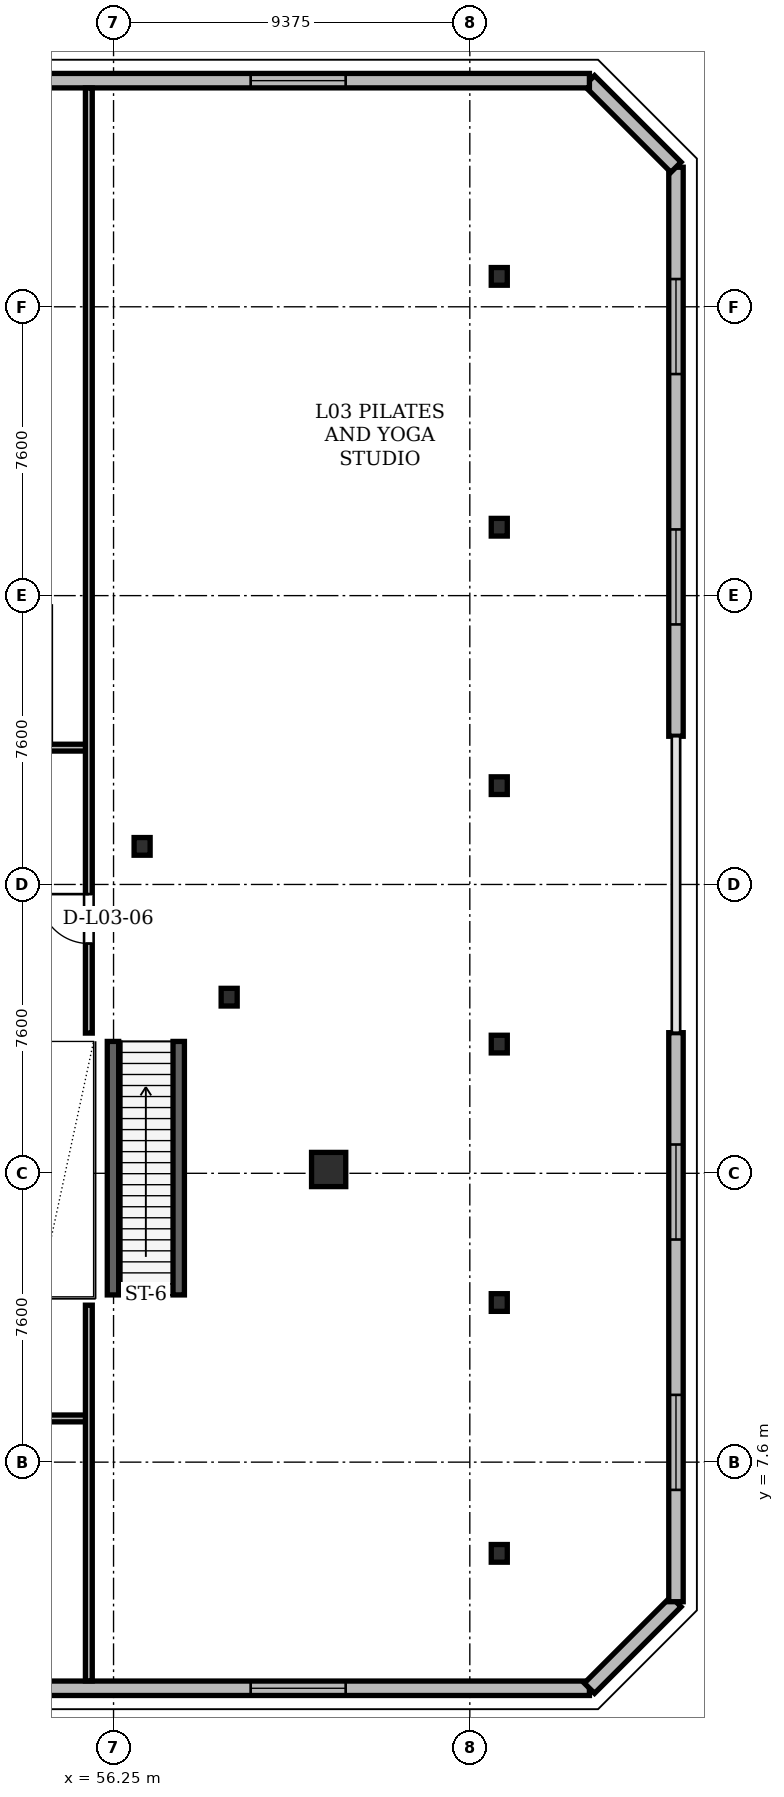
"""IFC4 building model, lengths in metres.
Left out: names, types, materials, properties, quantities, classifications, styles, units other than length and angle.
Written with IfcOpenShell. Run it as: python <this file> out.ifc"""

import sys

from ifc_helpers import new_model, si_unit, direction, frame, frame_2d, origin, origin_2d, place, context, subcontext, project, spatial, rectangle, hollow_rectangle, i_section, extrude, element, fill, save


model = new_model("IFC4")
c1 = context("Model", 3, precision=1e-05, world=origin(), true_north=direction((0.0, 1.0)))
c2 = subcontext(c1, "Body", "Model", "MODEL_VIEW")
j1 = project(units=[si_unit("LENGTHUNIT", "METRE"), si_unit("PLANEANGLEUNIT", "RADIAN")], contexts=[c1])
p1 = place(None, origin())
s1 = spatial("IfcSite", under=j1, at=p1, CompositionType="ELEMENT")
p2 = place(p1, origin())
s2 = spatial("IfcBuilding", under=s1, at=p2, CompositionType="ELEMENT")
p3 = place(p2, frame((0.0, 0.0, 14.1)))
s3 = spatial("IfcBuildingStorey", under=s2, at=p3, CompositionType="ELEMENT", Elevation=14.1)
p4 = place(p3, frame((61.91, 15.3, 0.004), z_axis=(0.0, 0.0, 1.0), x_axis=(1.0, 0.0, 0.0)))
e1 = element("IfcColumn", 1, at=p4, inside=s3, PredefinedType="COLUMN", context=c2, shape_type="SweptSolid", body=[
    extrude(hollow_rectangle(XDim=0.9, YDim=0.9, WallThickness=0.075, at=origin_2d()), origin(), (0.0, 0.0, 1.0), 4.191),
])
for number, where, z_axis, x_axis in (
    (2, (59.292, 19.834, 0.004), (0.0, 0.0, 1.0), (1.0, 0.0, 0.0)),
    (3, (57.002, 23.802, 0.004), (0.0, 0.0, 1.0), (1.0, 0.0, 0.0)),
):
    element("IfcColumn", number, at=place(p3, frame(where, z_axis=z_axis, x_axis=x_axis)), inside=s3, PredefinedType="COLUMN", context=c2, shape_type="SweptSolid", body=[
        extrude(i_section(OverallWidth=0.422, OverallDepth=0.465, WebThickness=0.045, FlangeThickness=0.072, at=origin_2d()), origin(), (0.0, 0.0, 1.0), 4.191),
    ])
for number, where, z_axis, x_axis in (
    (4, (66.4, 5.2, 0.0), (0.0, 0.0, 1.0), (1.0, 0.0, 0.0)),
    (5, (66.4, 11.8, 0.0), (0.0, 0.0, 1.0), (1.0, 0.0, 0.0)),
    (6, (66.4, 18.6, 0.0), (0.0, 0.0, 1.0), (1.0, 0.0, 0.0)),
    (7, (66.4, 25.4, 0.0), (0.0, 0.0, 1.0), (1.0, 0.0, 0.0)),
    (8, (66.4, 32.2, 0.0), (0.0, 0.0, 1.0), (1.0, 0.0, 0.0)),
    (9, (66.4, 38.8, 0.0), (0.0, 0.0, 1.0), (1.0, 0.0, 0.0)),
):
    element("IfcColumn", number, at=place(p3, frame(where, z_axis=z_axis, x_axis=x_axis)), inside=s3, PredefinedType="COLUMN", context=c2, shape_type="SweptSolid", body=[
        extrude(i_section(OverallWidth=0.422, OverallDepth=0.465, WebThickness=0.045, FlangeThickness=0.072, at=origin_2d()), origin(), (0.0, 0.0, 1.0), 4.2),
    ])
for number, where, z_axis, x_axis in (
    (10, (56.235, 12.0, 0.0), (0.0, 0.0, 1.0), (0.0, 1.0, 0.0)),
    (11, (57.965, 12.0, 0.0), (0.0, 0.0, 1.0), (0.0, 1.0, 0.0)),
):
    element("IfcWall", number, at=place(p3, frame(where, z_axis=z_axis, x_axis=x_axis)), inside=s3, PredefinedType="SHEAR", context=c2, shape_type="SweptSolid", body=[
        extrude(rectangle(XDim=6.67, YDim=0.3, at=frame_2d((3.335, 0.0))), origin(), (0.0, 0.0, 1.0), 3.92),
    ])
p5 = place(p3, frame((41.4, 1.65, 0.0), z_axis=(0.0, 0.0, 1.0), x_axis=(1.0, 0.0, 0.0)))
e12 = element("IfcWall", 12, at=p5, inside=s3, PredefinedType="SOLIDWALL", context=c2, shape_type="SweptSolid", body=[
    extrude(rectangle(XDim=27.372, YDim=0.38, at=frame_2d((13.686, 0.0))), origin(), (0.0, 0.0, 1.0), 2.983),
])
p6 = place(p5, frame((18.458, 0.0, 0.85)))
e13 = element("IfcOpeningElement", 13, at=p6, cuts=e12, PredefinedType="OPENING", context=c2, shape_type="SweptSolid", body=[
    extrude(rectangle(XDim=2.5, YDim=1.963, at=frame_2d((1.25, 0.981))), frame((0.0, 0.19, 0.0), z_axis=(0.0, -1.0, 0.0), x_axis=(1.0, 0.0, 0.0)), (0.0, 0.0, 1.0), 0.38),
])
p7 = place(p3, frame((68.772, 1.65, 0.0), z_axis=(0.0, 0.0, 1.0), x_axis=(0.707106781187, 0.707106781187, 0.0)))
e14 = element("IfcWall", 14, at=p7, inside=s3, PredefinedType="SOLIDWALL", context=c2, shape_type="SweptSolid", body=[
    extrude(rectangle(XDim=3.221, YDim=0.38, at=frame_2d((1.611, 0.0))), origin(), (0.0, 0.0, 1.0), 3.92),
])
p8 = place(p3, frame((71.05, 3.928, 0.0), z_axis=(0.0, 0.0, 1.0), x_axis=(0.0, 1.0, 0.0)))
e15 = element("IfcWall", 15, at=p8, inside=s3, PredefinedType="SOLIDWALL", context=c2, shape_type="SweptSolid", body=[
    extrude(rectangle(XDim=14.972, YDim=0.38, at=frame_2d((7.486, 0.0))), origin(), (0.0, 0.0, 1.0), 3.92),
])
p9 = place(p8, frame((2.942, 0.0, 0.85)))
e16 = element("IfcOpeningElement", 16, at=p9, cuts=e15, PredefinedType="OPENING", context=c2, shape_type="SweptSolid", body=[
    extrude(rectangle(XDim=2.5, YDim=2.15, at=frame_2d((1.25, 1.075))), frame((0.0, 0.19, 0.0), z_axis=(0.0, -1.0, 0.0), x_axis=(1.0, 0.0, 0.0)), (0.0, 0.0, 1.0), 0.38),
])
p10 = place(p8, frame((9.53, 0.0, 0.85)))
e17 = element("IfcOpeningElement", 17, at=p10, cuts=e15, PredefinedType="OPENING", context=c2, shape_type="SweptSolid", body=[
    extrude(rectangle(XDim=2.5, YDim=2.15, at=frame_2d((1.25, 1.075))), frame((0.0, 0.19, 0.0), z_axis=(0.0, -1.0, 0.0), x_axis=(1.0, 0.0, 0.0)), (0.0, 0.0, 1.0), 0.38),
])
p11 = place(p3, frame((71.05, 26.7, 0.0), z_axis=(0.0, 0.0, 1.0), x_axis=(0.0, 1.0, 0.0)))
e18 = element("IfcWall", 18, at=p11, inside=s3, PredefinedType="SOLIDWALL", context=c2, shape_type="SweptSolid", body=[
    extrude(rectangle(XDim=14.972, YDim=0.38, at=frame_2d((7.486, 0.0))), origin(), (0.0, 0.0, 1.0), 3.92),
])
p12 = place(p11, frame((2.942, 0.0, 0.85)))
e19 = element("IfcOpeningElement", 19, at=p12, cuts=e18, PredefinedType="OPENING", context=c2, shape_type="SweptSolid", body=[
    extrude(rectangle(XDim=2.5, YDim=2.15, at=frame_2d((1.25, 1.075))), frame((0.0, 0.19, 0.0), z_axis=(0.0, -1.0, 0.0), x_axis=(1.0, 0.0, 0.0)), (0.0, 0.0, 1.0), 0.38),
])
p13 = place(p11, frame((9.53, 0.0, 0.85)))
e20 = element("IfcOpeningElement", 20, at=p13, cuts=e18, PredefinedType="OPENING", context=c2, shape_type="SweptSolid", body=[
    extrude(rectangle(XDim=2.5, YDim=2.15, at=frame_2d((1.25, 1.075))), frame((0.0, 0.19, 0.0), z_axis=(0.0, -1.0, 0.0), x_axis=(1.0, 0.0, 0.0)), (0.0, 0.0, 1.0), 0.38),
])
p14 = place(p3, frame((71.05, 41.672, 0.0), z_axis=(0.0, 0.0, 1.0), x_axis=(-0.707106781187, 0.707106781187, 0.0)))
e21 = element("IfcWall", 21, at=p14, inside=s3, PredefinedType="SOLIDWALL", context=c2, shape_type="SweptSolid", body=[
    extrude(rectangle(XDim=3.221, YDim=0.38, at=frame_2d((1.611, 0.0))), origin(), (0.0, 0.0, 1.0), 3.92),
])
p15 = place(p3, frame((68.772, 43.95, 0.0), z_axis=(0.0, 0.0, 1.0), x_axis=(-1.0, 0.0, 0.0)))
e22 = element("IfcWall", 22, at=p15, inside=s3, PredefinedType="SOLIDWALL", context=c2, shape_type="SweptSolid", body=[
    extrude(rectangle(XDim=27.372, YDim=0.38, at=frame_2d((13.686, 0.0))), origin(), (0.0, 0.0, 1.0), 3.054),
])
p16 = place(p15, frame((6.414, 0.0, 0.85)))
e23 = element("IfcOpeningElement", 23, at=p16, cuts=e22, PredefinedType="OPENING", context=c2, shape_type="SweptSolid", body=[
    extrude(rectangle(XDim=2.5, YDim=2.034, at=frame_2d((1.25, 1.017))), frame((0.0, 0.19, 0.0), z_axis=(0.0, -1.0, 0.0), x_axis=(1.0, 0.0, 0.0)), (0.0, 0.0, 1.0), 0.38),
])
p17 = place(p15, frame((18.458, 0.0, 0.85)))
e24 = element("IfcOpeningElement", 24, at=p17, cuts=e22, PredefinedType="OPENING", context=c2, shape_type="SweptSolid", body=[
    extrude(rectangle(XDim=2.5, YDim=2.034, at=frame_2d((1.25, 1.017))), frame((0.0, 0.19, 0.0), z_axis=(0.0, -1.0, 0.0), x_axis=(1.0, 0.0, 0.0)), (0.0, 0.0, 1.0), 0.38),
])
p18 = place(p3, frame((14.03, 8.75, 0.0), z_axis=(0.0, 0.0, 1.0), x_axis=(1.0, 0.0, 0.0)))
e25 = element("IfcWall", 25, at=p18, inside=s3, PredefinedType="PARTITIONING", context=c2, shape_type="SweptSolid", body=[
    extrude(rectangle(XDim=41.57, YDim=0.18, at=frame_2d((20.785, 0.0))), origin(), (0.0, 0.0, 1.0), 2.983),
])
p19 = place(p18, frame((20.035, 0.0, 0.0)))
e26 = element("IfcOpeningElement", 26, at=p19, cuts=e25, PredefinedType="OPENING", context=c2, shape_type="SweptSolid", body=[
    extrude(rectangle(XDim=1.3, YDim=2.2, at=frame_2d((0.65, 1.1))), frame((0.0, 0.09, 0.0), z_axis=(0.0, -1.0, 0.0), x_axis=(1.0, 0.0, 0.0)), (0.0, 0.0, 1.0), 0.18),
])
p20 = place(p3, frame((27.05, 26.4, 0.0), z_axis=(0.0, 0.0, 1.0), x_axis=(1.0, 0.0, 0.0)))
e27 = element("IfcWall", 27, at=p20, inside=s3, PredefinedType="PARTITIONING", context=c2, shape_type="SweptSolid", body=[
    extrude(rectangle(XDim=28.55, YDim=0.18, at=frame_2d((14.275, 0.0))), origin(), (0.0, 0.0, 1.0), 2.983),
])
p21 = place(p20, frame((7.776, 0.0, 0.0)))
e28 = element("IfcOpeningElement", 28, at=p21, cuts=e27, PredefinedType="OPENING", context=c2, shape_type="SweptSolid", body=[
    extrude(rectangle(XDim=1.3, YDim=2.2, at=frame_2d((0.65, 1.1))), frame((0.0, 0.09, 0.0), z_axis=(0.0, -1.0, 0.0), x_axis=(1.0, 0.0, 0.0)), (0.0, 0.0, 1.0), 0.18),
])
p22 = place(p20, frame((19.437, 0.0, 0.0)))
e29 = element("IfcOpeningElement", 29, at=p22, cuts=e27, PredefinedType="OPENING", context=c2, shape_type="SweptSolid", body=[
    extrude(rectangle(XDim=0.88, YDim=2.08, at=frame_2d((0.44, 1.04))), frame((0.0, 0.09, 0.0), z_axis=(0.0, -1.0, 0.0), x_axis=(1.0, 0.0, 0.0)), (0.0, 0.0, 1.0), 0.18),
])
p23 = place(p20, frame((24.688, 0.0, 0.0)))
e30 = element("IfcOpeningElement", 30, at=p23, cuts=e27, PredefinedType="OPENING", context=c2, shape_type="SweptSolid", body=[
    extrude(rectangle(XDim=0.88, YDim=2.08, at=frame_2d((0.44, 1.04))), frame((0.0, 0.09, 0.0), z_axis=(0.0, -1.0, 0.0), x_axis=(1.0, 0.0, 0.0)), (0.0, 0.0, 1.0), 0.18),
])
p24 = place(p3, frame((55.6, 1.844, 0.0), z_axis=(0.0, 0.0, 1.0), x_axis=(0.0, 1.0, 0.0)))
e31 = element("IfcWall", 31, at=p24, inside=s3, PredefinedType="PARTITIONING", context=c2, shape_type="SweptSolid", body=[
    extrude(rectangle(XDim=9.886, YDim=0.18, at=frame_2d((4.943, 0.0))), origin(), (0.0, 0.0, 1.0), 3.054),
])
p25 = place(p3, frame((55.6, 18.889, 0.0), z_axis=(0.0, 0.0, 1.0), x_axis=(0.0, 1.0, 0.0)))
e32 = element("IfcWall", 32, at=p25, inside=s3, PredefinedType="PARTITIONING", context=c2, shape_type="SweptSolid", body=[
    extrude(rectangle(XDim=24.867, YDim=0.18, at=frame_2d((12.433, 0.0))), origin(), (0.0, 0.0, 1.0), 2.71),
])
p26 = place(p25, frame((2.356, 0.0, 0.0)))
e33 = element("IfcOpeningElement", 33, at=p26, cuts=e32, PredefinedType="OPENING", context=c2, shape_type="SweptSolid", body=[
    extrude(rectangle(XDim=1.3, YDim=2.2, at=frame_2d((0.65, 1.1))), frame((0.0, 0.09, 0.0), z_axis=(0.0, -1.0, 0.0), x_axis=(1.0, 0.0, 0.0)), (0.0, 0.0, 1.0), 0.18),
])
p27 = place(p6, origin())
e34 = element("IfcWindow", 34, at=p27, inside=s3, PartitioningType="SINGLE_PANEL", PredefinedType="WINDOW", context=c2, shape_type="SweptSolid", body=[
    extrude(rectangle(XDim=2.5, YDim=1.963, at=frame_2d((1.25, 0.981))), frame((0.0, 0.03, 0.0), z_axis=(0.0, -1.0, 0.0), x_axis=(1.0, 0.0, 0.0)), (0.0, 0.0, 1.0), 0.06),
])
fill(e13, e34)
p28 = place(p9, origin())
e35 = element("IfcWindow", 35, at=p28, inside=s3, PartitioningType="SINGLE_PANEL", PredefinedType="WINDOW", context=c2, shape_type="SweptSolid", body=[
    extrude(rectangle(XDim=2.5, YDim=2.15, at=frame_2d((1.25, 1.075))), frame((0.0, 0.03, 0.0), z_axis=(0.0, -1.0, 0.0), x_axis=(1.0, 0.0, 0.0)), (0.0, 0.0, 1.0), 0.06),
])
fill(e16, e35)
p29 = place(p10, origin())
e36 = element("IfcWindow", 36, at=p29, inside=s3, PartitioningType="SINGLE_PANEL", PredefinedType="WINDOW", context=c2, shape_type="SweptSolid", body=[
    extrude(rectangle(XDim=2.5, YDim=2.15, at=frame_2d((1.25, 1.075))), frame((0.0, 0.03, 0.0), z_axis=(0.0, -1.0, 0.0), x_axis=(1.0, 0.0, 0.0)), (0.0, 0.0, 1.0), 0.06),
])
fill(e17, e36)
p30 = place(p12, origin())
e37 = element("IfcWindow", 37, at=p30, inside=s3, PartitioningType="SINGLE_PANEL", PredefinedType="WINDOW", context=c2, shape_type="SweptSolid", body=[
    extrude(rectangle(XDim=2.5, YDim=2.15, at=frame_2d((1.25, 1.075))), frame((0.0, 0.03, 0.0), z_axis=(0.0, -1.0, 0.0), x_axis=(1.0, 0.0, 0.0)), (0.0, 0.0, 1.0), 0.06),
])
fill(e19, e37)
p31 = place(p13, origin())
e38 = element("IfcWindow", 38, at=p31, inside=s3, PartitioningType="SINGLE_PANEL", PredefinedType="WINDOW", context=c2, shape_type="SweptSolid", body=[
    extrude(rectangle(XDim=2.5, YDim=2.15, at=frame_2d((1.25, 1.075))), frame((0.0, 0.03, 0.0), z_axis=(0.0, -1.0, 0.0), x_axis=(1.0, 0.0, 0.0)), (0.0, 0.0, 1.0), 0.06),
])
fill(e20, e38)
p32 = place(p16, origin())
e39 = element("IfcWindow", 39, at=p32, inside=s3, PartitioningType="SINGLE_PANEL", PredefinedType="WINDOW", context=c2, shape_type="SweptSolid", body=[
    extrude(rectangle(XDim=2.5, YDim=2.034, at=frame_2d((1.25, 1.017))), frame((0.0, 0.03, 0.0), z_axis=(0.0, -1.0, 0.0), x_axis=(1.0, 0.0, 0.0)), (0.0, 0.0, 1.0), 0.06),
])
fill(e23, e39)
p33 = place(p26, origin())
e40 = element("IfcDoor", 40, at=p33, inside=s3, OperationType="SINGLE_SWING_RIGHT", PredefinedType="DOOR", context=c2, shape_type="SweptSolid", body=[
    extrude(rectangle(XDim=1.3, YDim=2.2, at=frame_2d((0.65, 1.1))), frame((0.0, 0.025, 0.0), z_axis=(0.0, -1.0, 0.0), x_axis=(1.0, 0.0, 0.0)), (0.0, 0.0, 1.0), 0.05),
])
fill(e33, e40)
save(model, sys.argv[1])
